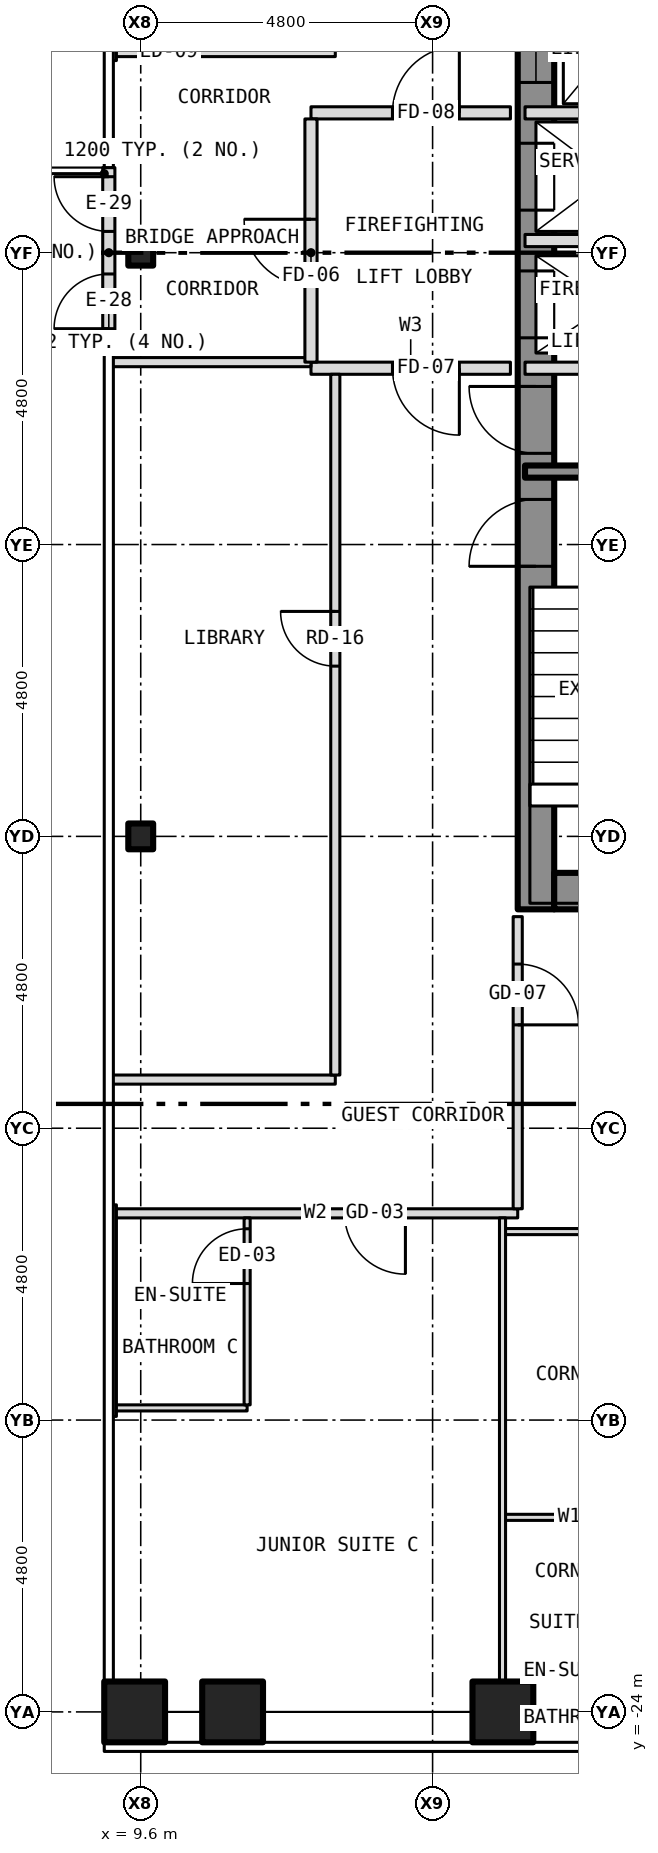
"""IFC4 building model, lengths in metres.
Left out: names, types, materials, properties, quantities, classifications, styles, units other than length and angle.
Written with IfcOpenShell. Run it as: python <this file> out.ifc"""

import sys

from ifc_helpers import new_model, si_unit, direction, frame, frame_2d, origin, origin_2d, place, context, subcontext, project, spatial, rectangle, hollow_rectangle, i_section, extrude, element, fill, save


model = new_model("IFC4")
c1 = context("Model", 3, precision=1e-05, world=origin(), true_north=direction((0.0, 1.0)))
c2 = subcontext(c1, "Body", "Model", "MODEL_VIEW")
j1 = project(units=[si_unit("LENGTHUNIT", "METRE"), si_unit("PLANEANGLEUNIT", "RADIAN")], contexts=[c1])
p1 = place(None, origin())
s1 = spatial("IfcSite", under=j1, at=p1, CompositionType="ELEMENT")
p2 = place(p1, origin())
s2 = spatial("IfcBuilding", under=s1, at=p2, CompositionType="ELEMENT")
p3 = place(p2, frame((0.0, 0.0, 70.5)))
s3 = spatial("IfcBuildingStorey", under=s2, at=p3, CompositionType="ELEMENT", Elevation=70.5)
for number, where, z_axis, x_axis in (
    (1, (11.111, -24.0, -0.15), (0.0, 0.0, 1.0), (1.0, 0.0, 0.0)),
    (2, (15.556, -24.0, -0.15), (0.0, 0.0, 1.0), (1.0, 0.0, 0.0)),
    (3, (9.5, -24.0, -0.15), (0.0, 0.0, 1.0), (1.0, 0.0, 0.0)),
):
    element("IfcColumn", number, at=place(p3, frame(where, z_axis=z_axis, x_axis=x_axis)), inside=s3, PredefinedType="COLUMN", context=c2, shape_type="SweptSolid", body=[
        extrude(hollow_rectangle(XDim=1.0, YDim=1.0, WallThickness=0.06, at=origin_2d()), origin(), (0.0, 0.0, 1.0), 3.5),
    ])
for number, where, z_axis, x_axis in (
    (4, (9.6, -9.6, -0.15), (0.0, 0.0, 1.0), (1.0, 0.0, 0.0)),
    (5, (9.6, 0.0, -0.15), (0.0, 0.0, 1.0), (1.0, 0.0, 0.0)),
):
    element("IfcColumn", number, at=place(p3, frame(where, z_axis=z_axis, x_axis=x_axis)), inside=s3, PredefinedType="COLUMN", context=c2, shape_type="SweptSolid", body=[
        extrude(i_section(OverallWidth=0.409, OverallDepth=0.424, WebThickness=0.033, FlangeThickness=0.052, at=origin_2d()), origin(), (0.0, 0.0, 1.0), 3.5),
    ])
p4 = place(p3, frame((16.1, -10.8, 0.0), z_axis=(0.0, 0.0, 1.0), x_axis=(0.0, 1.0, 0.0)))
e6 = element("IfcWall", 6, at=p4, inside=s3, PredefinedType="SHEAR", context=c2, shape_type="SweptSolid", body=[
    extrude(rectangle(XDim=21.6, YDim=0.6, at=frame_2d((10.8, 0.0))), origin(), (0.0, 0.0, 1.0), 3.25),
])
p5 = place(p4, frame((9.4, 0.0, 0.0)))
e7 = element("IfcOpeningElement", 7, at=p5, cuts=e6, PredefinedType="OPENING", context=c2, shape_type="SweptSolid", body=[
    extrude(rectangle(XDim=1.1, YDim=2.1, at=frame_2d((0.55, 1.05))), frame((0.0, 0.312, 0.0), z_axis=(0.0, -1.0, 0.0), x_axis=(1.0, 0.0, 0.0)), (0.0, 0.0, 1.0), 0.624),
])
p6 = place(p4, frame((11.5, 0.0, 0.0)))
e8 = element("IfcOpeningElement", 8, at=p6, cuts=e6, PredefinedType="OPENING", context=c2, shape_type="SweptSolid", body=[
    extrude(rectangle(XDim=1.1, YDim=2.1, at=frame_2d((0.55, 1.05))), frame((0.0, 0.312, 0.0), z_axis=(0.0, -1.0, 0.0), x_axis=(1.0, 0.0, 0.0)), (0.0, 0.0, 1.0), 0.624),
])
p7 = place(p4, frame((13.6, 0.0, 0.0)))
e9 = element("IfcOpeningElement", 9, at=p7, cuts=e6, PredefinedType="OPENING", context=c2, shape_type="SweptSolid", body=[
    extrude(rectangle(XDim=1.1, YDim=2.1, at=frame_2d((0.55, 1.05))), frame((0.0, 0.312, 0.0), z_axis=(0.0, -1.0, 0.0), x_axis=(1.0, 0.0, 0.0)), (0.0, 0.0, 1.0), 0.624),
])
p8 = place(p4, frame((15.7, 0.0, 0.0)))
e10 = element("IfcOpeningElement", 10, at=p8, cuts=e6, PredefinedType="OPENING", context=c2, shape_type="SweptSolid", body=[
    extrude(rectangle(XDim=1.1, YDim=2.1, at=frame_2d((0.55, 1.05))), frame((0.0, 0.312, 0.0), z_axis=(0.0, -1.0, 0.0), x_axis=(1.0, 0.0, 0.0)), (0.0, 0.0, 1.0), 0.624),
])
p9 = place(p4, frame((17.8, 0.0, 0.0)))
e11 = element("IfcOpeningElement", 11, at=p9, cuts=e6, PredefinedType="OPENING", context=c2, shape_type="SweptSolid", body=[
    extrude(rectangle(XDim=1.1, YDim=2.1, at=frame_2d((0.55, 1.05))), frame((0.0, 0.312, 0.0), z_axis=(0.0, -1.0, 0.0), x_axis=(1.0, 0.0, 0.0)), (0.0, 0.0, 1.0), 0.624),
])
p10 = place(p4, frame((5.642, 0.0, 0.0)))
e12 = element("IfcOpeningElement", 12, at=p10, cuts=e6, PredefinedType="OPENING", context=c2, shape_type="SweptSolid", body=[
    extrude(rectangle(XDim=1.1, YDim=2.1, at=frame_2d((0.55, 1.05))), frame((0.0, 0.312, 0.0), z_axis=(0.0, -1.0, 0.0), x_axis=(1.0, 0.0, 0.0)), (0.0, 0.0, 1.0), 0.624),
])
p11 = place(p4, frame((7.5, 0.0, 0.0)))
e13 = element("IfcOpeningElement", 13, at=p11, cuts=e6, PredefinedType="OPENING", context=c2, shape_type="SweptSolid", body=[
    extrude(rectangle(XDim=1.1, YDim=2.1, at=frame_2d((0.55, 1.05))), frame((0.0, 0.312, 0.0), z_axis=(0.0, -1.0, 0.0), x_axis=(1.0, 0.0, 0.0)), (0.0, 0.0, 1.0), 0.624),
])
p12 = place(p3, frame((16.4, -10.5, 0.0), z_axis=(0.0, 0.0, 1.0), x_axis=(1.0, 0.0, 0.0)))
e14 = element("IfcWall", 14, at=p12, inside=s3, PredefinedType="SHEAR", context=c2, shape_type="SweptSolid", body=[
    extrude(rectangle(XDim=7.0, YDim=0.6, at=frame_2d((3.5, 0.0))), origin(), (0.0, 0.0, 1.0), 3.25),
])
p13 = place(p3, frame((9.075, -1.4, 0.0), z_axis=(0.0, 0.0, 1.0), x_axis=(0.0, 1.0, 0.0)))
e15 = element("IfcWall", 15, at=p13, inside=s3, PredefinedType="SOLIDWALL", context=c2, shape_type="SweptSolid", body=[
    extrude(rectangle(XDim=2.8, YDim=0.2, at=frame_2d((1.4, 0.0))), origin(), (0.0, 0.0, 1.0), 3.5),
])
p14 = place(p13, frame((0.15, 0.0, 0.0)))
e16 = element("IfcOpeningElement", 16, at=p14, cuts=e15, PredefinedType="OPENING", context=c2, shape_type="SweptSolid", body=[
    extrude(rectangle(XDim=0.9, YDim=2.1, at=frame_2d((0.45, 1.05))), frame((0.0, 0.112, 0.0), z_axis=(0.0, -1.0, 0.0), x_axis=(1.0, 0.0, 0.0)), (0.0, 0.0, 1.0), 0.224),
])
p15 = place(p13, frame((1.75, 0.0, 0.0)))
e17 = element("IfcOpeningElement", 17, at=p15, cuts=e15, PredefinedType="OPENING", context=c2, shape_type="SweptSolid", body=[
    extrude(rectangle(XDim=0.9, YDim=2.1, at=frame_2d((0.45, 1.05))), frame((0.0, 0.112, 0.0), z_axis=(0.0, -1.0, 0.0), x_axis=(1.0, 0.0, 0.0)), (0.0, 0.0, 1.0), 0.224),
])
p16 = place(p3, frame((15.55, -20.8, 0.0), z_axis=(0.0, 0.0, 1.0), x_axis=(1.0, 0.0, 0.0)))
e18 = element("IfcWall", 18, at=p16, inside=s3, PredefinedType="PARTITIONING", context=c2, shape_type="SweptSolid", body=[
    extrude(rectangle(XDim=2.2, YDim=0.1, at=frame_2d((1.1, 0.0))), origin(), (0.0, 0.0, 1.0), 3.35),
])
p17 = place(p3, frame((9.15, -19.0, 0.0), z_axis=(0.0, 0.0, 1.0), x_axis=(1.0, 0.0, 0.0)))
e19 = element("IfcWall", 19, at=p17, inside=s3, PredefinedType="PARTITIONING", context=c2, shape_type="SweptSolid", body=[
    extrude(rectangle(XDim=2.2, YDim=0.1, at=frame_2d((1.1, 0.0))), origin(), (0.0, 0.0, 1.0), 3.35),
])
p18 = place(p3, frame((15.55, -16.1, 0.0), z_axis=(0.0, 0.0, 1.0), x_axis=(1.0, 0.0, 0.0)))
e20 = element("IfcWall", 20, at=p18, inside=s3, PredefinedType="PARTITIONING", context=c2, shape_type="SweptSolid", body=[
    extrude(rectangle(XDim=8.33, YDim=0.1, at=frame_2d((4.165, 0.0))), origin(), (0.0, 0.0, 1.0), 3.35),
])
p19 = place(p18, frame((3.778, 0.0, 0.0)))
e21 = element("IfcOpeningElement", 21, at=p19, cuts=e20, PredefinedType="OPENING", context=c2, shape_type="SweptSolid", body=[
    extrude(rectangle(XDim=0.9, YDim=2.1, at=frame_2d((0.45, 1.05))), frame((0.0, 0.062, 0.0), z_axis=(0.0, -1.0, 0.0), x_axis=(1.0, 0.0, 0.0)), (0.0, 0.0, 1.0), 0.124),
])
p20 = place(p3, frame((9.15, -15.8, 0.0), z_axis=(0.0, 0.0, 1.0), x_axis=(1.0, 0.0, 0.0)))
e22 = element("IfcWall", 22, at=p20, inside=s3, PredefinedType="PARTITIONING", context=c2, shape_type="SweptSolid", body=[
    extrude(rectangle(XDim=6.65, YDim=0.15, at=frame_2d((3.325, 0.0))), origin(), (0.0, 0.0, 1.0), 3.35),
])
p21 = place(p20, frame((3.803, 0.0, 0.0)))
e23 = element("IfcOpeningElement", 23, at=p21, cuts=e22, PredefinedType="OPENING", context=c2, shape_type="SweptSolid", body=[
    extrude(rectangle(XDim=1.0, YDim=2.1, at=frame_2d((0.5, 1.05))), frame((0.0, 0.087, 0.0), z_axis=(0.0, -1.0, 0.0), x_axis=(1.0, 0.0, 0.0)), (0.0, 0.0, 1.0), 0.174),
])
p22 = place(p3, frame((9.12, -13.6, 0.0), z_axis=(0.0, 0.0, 1.0), x_axis=(1.0, 0.0, 0.0)))
e24 = element("IfcWall", 24, at=p22, inside=s3, PredefinedType="PARTITIONING", context=c2, shape_type="SweptSolid", body=[
    extrude(rectangle(XDim=3.68, YDim=0.15, at=frame_2d((1.84, 0.0))), origin(), (0.0, 0.0, 1.0), 3.35),
])
p23 = place(p3, frame((15.92, -3.6, 0.0), z_axis=(0.0, 0.0, 1.0), x_axis=(1.0, 0.0, 0.0)))
e25 = element("IfcWall", 25, at=p23, inside=s3, PredefinedType="SHEAR", context=c2, shape_type="SweptSolid", body=[
    extrude(rectangle(XDim=4.08, YDim=0.2, at=frame_2d((2.04, 0.0))), origin(), (0.0, 0.0, 1.0), 3.25),
])
p24 = place(p3, frame((12.4, -1.9, 0.0), z_axis=(0.0, 0.0, 1.0), x_axis=(1.0, 0.0, 0.0)))
e26 = element("IfcWall", 26, at=p24, inside=s3, PredefinedType="PARTITIONING", context=c2, shape_type="SweptSolid", body=[
    extrude(rectangle(XDim=3.28, YDim=0.2, at=frame_2d((1.64, 0.0))), origin(), (0.0, 0.0, 1.0), 3.35),
])
p25 = place(p24, frame((1.34, 0.0, 0.0)))
e27 = element("IfcOpeningElement", 27, at=p25, cuts=e26, PredefinedType="OPENING", context=c2, shape_type="SweptSolid", body=[
    extrude(rectangle(XDim=1.1, YDim=2.1, at=frame_2d((0.55, 1.05))), frame((0.0, 0.112, 0.0), z_axis=(0.0, -1.0, 0.0), x_axis=(1.0, 0.0, 0.0)), (0.0, 0.0, 1.0), 0.224),
])
p26 = place(p3, frame((15.92, -1.9, 0.0), z_axis=(0.0, 0.0, 1.0), x_axis=(1.0, 0.0, 0.0)))
e28 = element("IfcWall", 28, at=p26, inside=s3, PredefinedType="PARTITIONING", context=c2, shape_type="SweptSolid", body=[
    extrude(rectangle(XDim=7.96, YDim=0.2, at=frame_2d((3.98, 0.0))), origin(), (0.0, 0.0, 1.0), 3.25),
])
p27 = place(p26, frame((3.74, 0.0, 0.0)))
e29 = element("IfcOpeningElement", 29, at=p27, cuts=e28, PredefinedType="OPENING", context=c2, shape_type="SweptSolid", body=[
    extrude(rectangle(XDim=0.9, YDim=2.1, at=frame_2d((0.45, 1.05))), frame((0.0, 0.112, 0.0), z_axis=(0.0, -1.0, 0.0), x_axis=(1.0, 0.0, 0.0)), (0.0, 0.0, 1.0), 0.224),
])
p28 = place(p3, frame((9.12, -1.8, 0.0), z_axis=(0.0, 0.0, 1.0), x_axis=(1.0, 0.0, 0.0)))
e30 = element("IfcWall", 30, at=p28, inside=s3, PredefinedType="PARTITIONING", context=c2, shape_type="SweptSolid", body=[
    extrude(rectangle(XDim=3.28, YDim=0.15, at=frame_2d((1.64, 0.0))), origin(), (0.0, 0.0, 1.0), 3.35),
])
p29 = place(p3, frame((15.92, 0.2, 0.0), z_axis=(0.0, 0.0, 1.0), x_axis=(1.0, 0.0, 0.0)))
e31 = element("IfcWall", 31, at=p29, inside=s3, PredefinedType="PARTITIONING", context=c2, shape_type="SweptSolid", body=[
    extrude(rectangle(XDim=2.88, YDim=0.2, at=frame_2d((1.44, 0.0))), origin(), (0.0, 0.0, 1.0), 3.25),
])
p30 = place(p3, frame((12.4, 2.3, 0.0), z_axis=(0.0, 0.0, 1.0), x_axis=(1.0, 0.0, 0.0)))
e32 = element("IfcWall", 32, at=p30, inside=s3, PredefinedType="PARTITIONING", context=c2, shape_type="SweptSolid", body=[
    extrude(rectangle(XDim=3.28, YDim=0.2, at=frame_2d((1.64, 0.0))), origin(), (0.0, 0.0, 1.0), 3.35),
])
p31 = place(p30, frame((1.34, 0.0, 0.0)))
e33 = element("IfcOpeningElement", 33, at=p31, cuts=e32, PredefinedType="OPENING", context=c2, shape_type="SweptSolid", body=[
    extrude(rectangle(XDim=1.1, YDim=2.1, at=frame_2d((0.55, 1.05))), frame((0.0, 0.112, 0.0), z_axis=(0.0, -1.0, 0.0), x_axis=(1.0, 0.0, 0.0)), (0.0, 0.0, 1.0), 0.224),
])
p32 = place(p3, frame((15.92, 2.3, 0.0), z_axis=(0.0, 0.0, 1.0), x_axis=(1.0, 0.0, 0.0)))
e34 = element("IfcWall", 34, at=p32, inside=s3, PredefinedType="PARTITIONING", context=c2, shape_type="SweptSolid", body=[
    extrude(rectangle(XDim=2.88, YDim=0.2, at=frame_2d((1.44, 0.0))), origin(), (0.0, 0.0, 1.0), 3.25),
])
p33 = place(p3, frame((9.15, 3.3, 0.0), z_axis=(0.0, 0.0, 1.0), x_axis=(1.0, 0.0, 0.0)))
e35 = element("IfcWall", 35, at=p33, inside=s3, PredefinedType="PARTITIONING", context=c2, shape_type="SweptSolid", body=[
    extrude(rectangle(XDim=3.65, YDim=0.15, at=frame_2d((1.825, 0.0))), origin(), (0.0, 0.0, 1.0), 3.35),
])
p34 = place(p33, frame((0.462, 0.0, 0.0)))
e36 = element("IfcOpeningElement", 36, at=p34, cuts=e35, PredefinedType="OPENING", context=c2, shape_type="SweptSolid", body=[
    extrude(rectangle(XDim=0.9, YDim=2.1, at=frame_2d((0.45, 1.05))), frame((0.0, 0.087, 0.0), z_axis=(0.0, -1.0, 0.0), x_axis=(1.0, 0.0, 0.0)), (0.0, 0.0, 1.0), 0.174),
])
p35 = place(p3, frame((9.15, -19.14, 0.0), z_axis=(0.0, 0.0, 1.0), x_axis=(0.0, 1.0, 0.0)))
e37 = element("IfcWall", 37, at=p35, inside=s3, PredefinedType="PARTITIONING", context=c2, shape_type="SweptSolid", body=[
    extrude(rectangle(XDim=3.48, YDim=0.1, at=frame_2d((1.74, 0.0))), origin(), (0.0, 0.0, 1.0), 2.733),
])
p36 = place(p3, frame((9.15, 3.16, 0.0), z_axis=(0.0, 0.0, 1.0), x_axis=(0.0, 1.0, 0.0)))
e38 = element("IfcWall", 38, at=p36, inside=s3, PredefinedType="PARTITIONING", context=c2, shape_type="SweptSolid", body=[
    extrude(rectangle(XDim=10.58, YDim=0.1, at=frame_2d((5.29, 0.0))), origin(), (0.0, 0.0, 1.0), 2.733),
])
p37 = place(p3, frame((11.35, -18.95, 0.0), z_axis=(0.0, 0.0, 1.0), x_axis=(0.0, 1.0, 0.0)))
e39 = element("IfcWall", 39, at=p37, inside=s3, PredefinedType="PARTITIONING", context=c2, shape_type="SweptSolid", body=[
    extrude(rectangle(XDim=3.075, YDim=0.1, at=frame_2d((1.538, 0.0))), origin(), (0.0, 0.0, 1.0), 3.35),
])
p38 = place(p37, frame((1.996, 0.0, 0.0)))
e40 = element("IfcOpeningElement", 40, at=p38, cuts=e39, PredefinedType="OPENING", context=c2, shape_type="SweptSolid", body=[
    extrude(rectangle(XDim=0.9, YDim=2.1, at=frame_2d((0.45, 1.05))), frame((0.0, 0.062, 0.0), z_axis=(0.0, -1.0, 0.0), x_axis=(1.0, 0.0, 0.0)), (0.0, 0.0, 1.0), 0.124),
])
p39 = place(p3, frame((12.4, -1.8, 0.0), z_axis=(0.0, 0.0, 1.0), x_axis=(0.0, 1.0, 0.0)))
e41 = element("IfcWall", 41, at=p39, inside=s3, PredefinedType="PARTITIONING", context=c2, shape_type="SweptSolid", body=[
    extrude(rectangle(XDim=4.0, YDim=0.2, at=frame_2d((2.0, 0.0))), origin(), (0.0, 0.0, 1.0), 3.35),
])
p40 = place(p39, frame((1.25, 0.0, 0.0)))
e42 = element("IfcOpeningElement", 42, at=p40, cuts=e41, PredefinedType="OPENING", context=c2, shape_type="SweptSolid", body=[
    extrude(rectangle(XDim=1.1, YDim=2.1, at=frame_2d((0.55, 1.05))), frame((0.0, 0.112, 0.0), z_axis=(0.0, -1.0, 0.0), x_axis=(1.0, 0.0, 0.0)), (0.0, 0.0, 1.0), 0.224),
])
p41 = place(p3, frame((12.8, -13.525, 0.0), z_axis=(0.0, 0.0, 1.0), x_axis=(0.0, 1.0, 0.0)))
e43 = element("IfcWall", 43, at=p41, inside=s3, PredefinedType="PARTITIONING", context=c2, shape_type="SweptSolid", body=[
    extrude(rectangle(XDim=11.525, YDim=0.15, at=frame_2d((5.762, 0.0))), origin(), (0.0, 0.0, 1.0), 3.35),
])
p42 = place(p41, frame((6.725, 0.0, 0.0)))
e44 = element("IfcOpeningElement", 44, at=p42, cuts=e43, PredefinedType="OPENING", context=c2, shape_type="SweptSolid", body=[
    extrude(rectangle(XDim=0.9, YDim=2.1, at=frame_2d((0.45, 1.05))), frame((0.0, 0.087, 0.0), z_axis=(0.0, -1.0, 0.0), x_axis=(1.0, 0.0, 0.0)), (0.0, 0.0, 1.0), 0.174),
])
p43 = place(p3, frame((15.55, -23.88, 0.0), z_axis=(0.0, 0.0, 1.0), x_axis=(0.0, 1.0, 0.0)))
e45 = element("IfcWall", 45, at=p43, inside=s3, PredefinedType="PARTITIONING", context=c2, shape_type="SweptSolid", body=[
    extrude(rectangle(XDim=8.005, YDim=0.1, at=frame_2d((4.002, 0.0))), origin(), (0.0, 0.0, 1.0), 3.35),
])
p44 = place(p3, frame((15.8, -15.725, 0.0), z_axis=(0.0, 0.0, 1.0), x_axis=(0.0, 1.0, 0.0)))
e46 = element("IfcWall", 46, at=p44, inside=s3, PredefinedType="PARTITIONING", context=c2, shape_type="SweptSolid", body=[
    extrude(rectangle(XDim=4.805, YDim=0.15, at=frame_2d((2.403, 0.0))), origin(), (0.0, 0.0, 1.0), 3.35),
])
p45 = place(p44, frame((3.025, 0.0, 0.0)))
e47 = element("IfcOpeningElement", 47, at=p45, cuts=e46, PredefinedType="OPENING", context=c2, shape_type="SweptSolid", body=[
    extrude(rectangle(XDim=1.0, YDim=2.1, at=frame_2d((0.5, 1.05))), frame((0.0, 0.087, 0.0), z_axis=(0.0, -1.0, 0.0), x_axis=(1.0, 0.0, 0.0)), (0.0, 0.0, 1.0), 0.174),
])
p46 = place(p14, origin())
e48 = element("IfcDoor", 48, at=p46, inside=s3, OperationType="SINGLE_SWING_LEFT", PredefinedType="DOOR", context=c2, shape_type="SweptSolid", body=[
    extrude(rectangle(XDim=0.9, YDim=2.1, at=frame_2d((0.45, 1.05))), frame((0.0, 0.025, 0.0), z_axis=(0.0, -1.0, 0.0), x_axis=(1.0, 0.0, 0.0)), (0.0, 0.0, 1.0), 0.05),
])
fill(e16, e48)
p47 = place(p15, origin())
e49 = element("IfcDoor", 49, at=p47, inside=s3, OperationType="SINGLE_SWING_RIGHT", PredefinedType="DOOR", context=c2, shape_type="SweptSolid", body=[
    extrude(rectangle(XDim=0.9, YDim=2.1, at=frame_2d((0.45, 1.05))), frame((0.0, 0.025, 0.0), z_axis=(0.0, -1.0, 0.0), x_axis=(1.0, 0.0, 0.0)), (0.0, 0.0, 1.0), 0.05),
])
fill(e17, e49)
p48 = place(p5, origin())
e50 = element("IfcDoor", 50, at=p48, inside=s3, OperationType="SLIDING_TO_LEFT", PredefinedType="DOOR", context=c2, shape_type="SweptSolid", body=[
    extrude(rectangle(XDim=1.1, YDim=2.1, at=frame_2d((0.55, 1.05))), frame((0.0, 0.025, 0.0), z_axis=(0.0, -1.0, 0.0), x_axis=(1.0, 0.0, 0.0)), (0.0, 0.0, 1.0), 0.05),
])
fill(e7, e50)
p49 = place(p6, origin())
e51 = element("IfcDoor", 51, at=p49, inside=s3, OperationType="SLIDING_TO_LEFT", PredefinedType="DOOR", context=c2, shape_type="SweptSolid", body=[
    extrude(rectangle(XDim=1.1, YDim=2.1, at=frame_2d((0.55, 1.05))), frame((0.0, 0.025, 0.0), z_axis=(0.0, -1.0, 0.0), x_axis=(1.0, 0.0, 0.0)), (0.0, 0.0, 1.0), 0.05),
])
fill(e8, e51)
p50 = place(p7, origin())
e52 = element("IfcDoor", 52, at=p50, inside=s3, OperationType="SLIDING_TO_LEFT", PredefinedType="DOOR", context=c2, shape_type="SweptSolid", body=[
    extrude(rectangle(XDim=1.1, YDim=2.1, at=frame_2d((0.55, 1.05))), frame((0.0, 0.025, 0.0), z_axis=(0.0, -1.0, 0.0), x_axis=(1.0, 0.0, 0.0)), (0.0, 0.0, 1.0), 0.05),
])
fill(e9, e52)
p51 = place(p10, origin())
e53 = element("IfcDoor", 53, at=p51, inside=s3, OperationType="SINGLE_SWING_LEFT", PredefinedType="DOOR", context=c2, shape_type="SweptSolid", body=[
    extrude(rectangle(XDim=1.1, YDim=2.1, at=frame_2d((0.55, 1.05))), frame((0.0, 0.025, 0.0), z_axis=(0.0, -1.0, 0.0), x_axis=(1.0, 0.0, 0.0)), (0.0, 0.0, 1.0), 0.05),
])
fill(e12, e53)
p52 = place(p11, origin())
e54 = element("IfcDoor", 54, at=p52, inside=s3, OperationType="SINGLE_SWING_RIGHT", PredefinedType="DOOR", context=c2, shape_type="SweptSolid", body=[
    extrude(rectangle(XDim=1.1, YDim=2.1, at=frame_2d((0.55, 1.05))), frame((0.0, 0.025, 0.0), z_axis=(0.0, -1.0, 0.0), x_axis=(1.0, 0.0, 0.0)), (0.0, 0.0, 1.0), 0.05),
])
fill(e13, e54)
p53 = place(p40, origin())
e55 = element("IfcDoor", 55, at=p53, inside=s3, OperationType="SINGLE_SWING_RIGHT", PredefinedType="DOOR", context=c2, shape_type="SweptSolid", body=[
    extrude(rectangle(XDim=1.1, YDim=2.1, at=frame_2d((0.55, 1.05))), frame((0.0, 0.025, 0.0), z_axis=(0.0, -1.0, 0.0), x_axis=(1.0, 0.0, 0.0)), (0.0, 0.0, 1.0), 0.05),
])
fill(e42, e55)
p54 = place(p25, origin())
e56 = element("IfcDoor", 56, at=p54, inside=s3, OperationType="SINGLE_SWING_RIGHT", PredefinedType="DOOR", context=c2, shape_type="SweptSolid", body=[
    extrude(rectangle(XDim=1.1, YDim=2.1, at=frame_2d((0.55, 1.05))), frame((0.0, 0.025, 0.0), z_axis=(0.0, -1.0, 0.0), x_axis=(1.0, 0.0, 0.0)), (0.0, 0.0, 1.0), 0.05),
])
fill(e27, e56)
p55 = place(p31, origin())
e57 = element("IfcDoor", 57, at=p55, inside=s3, OperationType="SINGLE_SWING_RIGHT", PredefinedType="DOOR", context=c2, shape_type="SweptSolid", body=[
    extrude(rectangle(XDim=1.1, YDim=2.1, at=frame_2d((0.55, 1.05))), frame((0.0, 0.025, 0.0), z_axis=(0.0, -1.0, 0.0), x_axis=(1.0, 0.0, 0.0)), (0.0, 0.0, 1.0), 0.05),
])
fill(e33, e57)
p56 = place(p21, origin())
e58 = element("IfcDoor", 58, at=p56, inside=s3, OperationType="SINGLE_SWING_RIGHT", PredefinedType="DOOR", context=c2, shape_type="SweptSolid", body=[
    extrude(rectangle(XDim=1.0, YDim=2.1, at=frame_2d((0.5, 1.05))), frame((0.0, 0.025, 0.0), z_axis=(0.0, -1.0, 0.0), x_axis=(1.0, 0.0, 0.0)), (0.0, 0.0, 1.0), 0.05),
])
fill(e23, e58)
p57 = place(p38, origin())
e59 = element("IfcDoor", 59, at=p57, inside=s3, OperationType="SINGLE_SWING_LEFT", PredefinedType="DOOR", context=c2, shape_type="SweptSolid", body=[
    extrude(rectangle(XDim=0.9, YDim=2.1, at=frame_2d((0.45, 1.05))), frame((0.0, 0.025, 0.0), z_axis=(0.0, -1.0, 0.0), x_axis=(1.0, 0.0, 0.0)), (0.0, 0.0, 1.0), 0.05),
])
fill(e40, e59)
p58 = place(p45, origin())
e60 = element("IfcDoor", 60, at=p58, inside=s3, OperationType="SINGLE_SWING_LEFT", PredefinedType="DOOR", context=c2, shape_type="SweptSolid", body=[
    extrude(rectangle(XDim=1.0, YDim=2.1, at=frame_2d((0.5, 1.05))), frame((0.0, 0.025, 0.0), z_axis=(0.0, -1.0, 0.0), x_axis=(1.0, 0.0, 0.0)), (0.0, 0.0, 1.0), 0.05),
])
fill(e47, e60)
p59 = place(p34, origin())
e61 = element("IfcDoor", 61, at=p59, inside=s3, OperationType="SINGLE_SWING_LEFT", PredefinedType="DOOR", context=c2, shape_type="SweptSolid", body=[
    extrude(rectangle(XDim=0.9, YDim=2.1, at=frame_2d((0.45, 1.05))), frame((0.0, 0.025, 0.0), z_axis=(0.0, -1.0, 0.0), x_axis=(1.0, 0.0, 0.0)), (0.0, 0.0, 1.0), 0.05),
])
fill(e36, e61)
p60 = place(p42, origin())
e62 = element("IfcDoor", 62, at=p60, inside=s3, OperationType="SINGLE_SWING_RIGHT", PredefinedType="DOOR", context=c2, shape_type="SweptSolid", body=[
    extrude(rectangle(XDim=0.9, YDim=2.1, at=frame_2d((0.45, 1.05))), frame((0.0, 0.025, 0.0), z_axis=(0.0, -1.0, 0.0), x_axis=(1.0, 0.0, 0.0)), (0.0, 0.0, 1.0), 0.05),
])
fill(e44, e62)
save(model, sys.argv[1])
